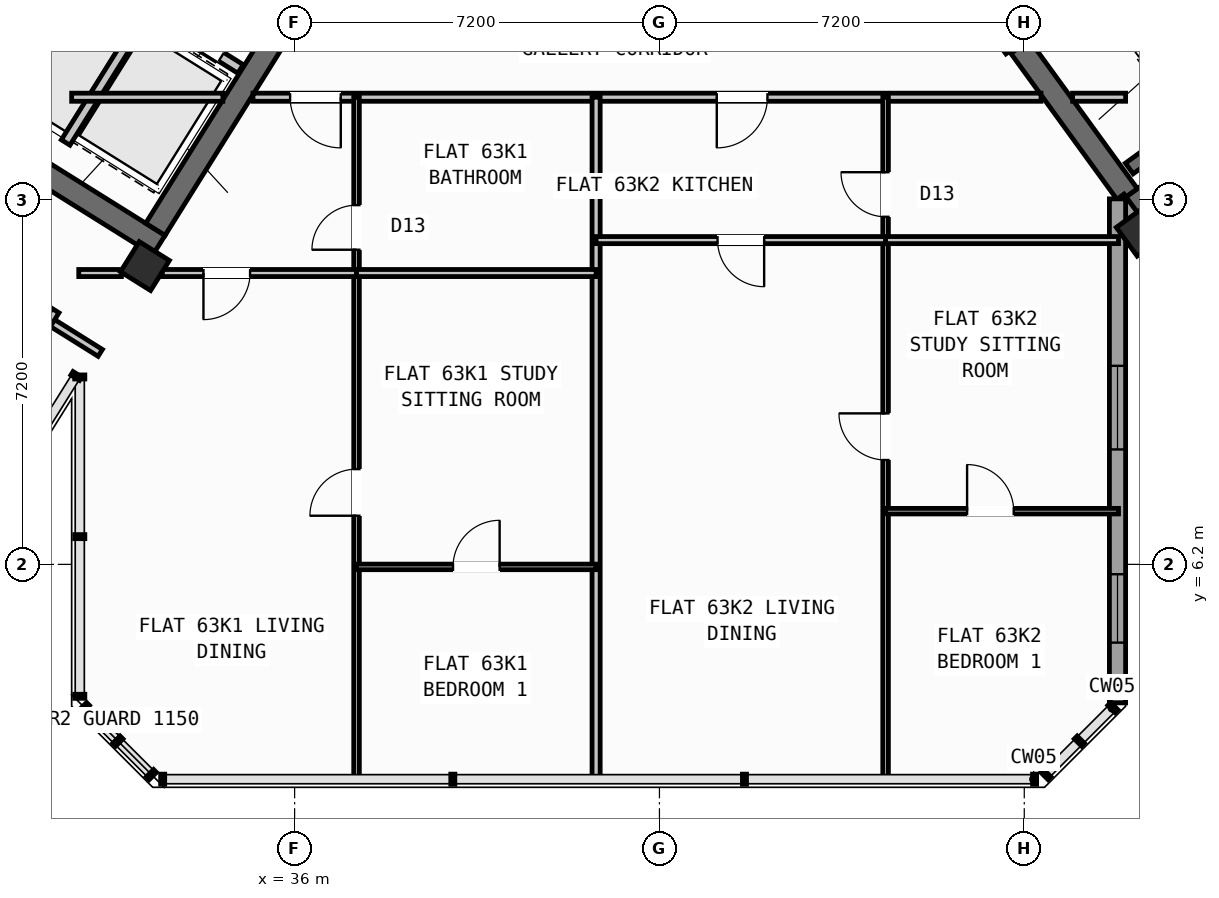
"""IFC4 building model, lengths in metres.
Left out: names, types, materials, properties, quantities, classifications, styles, units other than length and angle.
Written with IfcOpenShell. Run it as: python <this file> out.ifc"""

import sys

from ifc_helpers import new_model, si_unit, direction, frame, frame_2d, origin, origin_2d, place, context, subcontext, project, spatial, rectangle, hollow_rectangle, extrude, source, transform, mapped, element, fill, save


model = new_model("IFC4")
c1 = context("Model", 3, precision=1e-05, world=origin(), true_north=direction((0.0, 1.0)))
c2 = subcontext(c1, "Body", "Model", "MODEL_VIEW")
j1 = project(units=[si_unit("LENGTHUNIT", "METRE"), si_unit("PLANEANGLEUNIT", "RADIAN")], contexts=[c1])
p1 = place(None, origin())
s1 = spatial("IfcSite", under=j1, at=p1, CompositionType="ELEMENT")
p2 = place(p1, origin())
s2 = spatial("IfcBuilding", under=s1, at=p2, CompositionType="ELEMENT")
p3 = place(p2, frame((0.0, 0.0, 251.1)))
s3 = spatial("IfcBuildingStorey", under=s2, at=p3, CompositionType="ELEMENT", Elevation=251.1)
p4 = place(p3, frame((33.324, 12.503, 0.0), z_axis=(0.0, 0.0, 1.0), x_axis=(-0.848043529849, 0.529926571782, 0.0)))
e1 = element("IfcWall", 1, at=p4, inside=s3, PredefinedType="SHEAR", context=c2, shape_type="SweptSolid", body=[
    extrude(rectangle(XDim=13.04, YDim=0.45, at=frame_2d((6.52, 0.0))), origin(), (0.0, 0.0, 1.0), 3.32),
])
p5 = place(p3, frame((36.683, 18.304, 0.0), z_axis=(0.0, 0.0, 1.0), x_axis=(-0.529904039071, -0.848057609704, 0.0)))
e2 = element("IfcWall", 2, at=p5, inside=s3, PredefinedType="SHEAR", context=c2, shape_type="SweptSolid", body=[
    extrude(rectangle(XDim=6.475, YDim=0.45, at=frame_2d((3.238, 0.0))), origin(), (0.0, 0.0, 1.0), 3.32),
])
p6 = place(p3, frame((52.399, 13.169, 0.0), z_axis=(0.0, 0.0, 1.0), x_axis=(0.809022352778, 0.587777877013, 0.0)))
e3 = element("IfcWall", 3, at=p6, inside=s3, PredefinedType="SHEAR", context=c2, shape_type="SweptSolid", body=[
    extrude(rectangle(XDim=12.24, YDim=0.45, at=frame_2d((6.12, 0.0))), origin(), (0.0, 0.0, 1.0), 3.32),
])
p7 = place(p3, frame((52.449, 13.483, 0.0), z_axis=(0.0, 0.0, 1.0), x_axis=(-0.587819244441, 0.808992296542, 0.0)))
e4 = element("IfcWall", 4, at=p7, inside=s3, PredefinedType="SHEAR", context=c2, shape_type="SweptSolid", body=[
    extrude(rectangle(XDim=3.625, YDim=0.45, at=frame_2d((1.812, 0.0))), origin(), (0.0, 0.0, 1.0), 3.32),
])
m1 = source(origin(), c2, "Body", "SweptSolid", [
    extrude(hollow_rectangle(XDim=0.7, YDim=0.7, WallThickness=0.028, at=origin_2d()), origin(), (0.0, 0.0, 1.0), 3.6),
])
for number, where, z_axis, x_axis in (
    (5, (33.046, 12.087, 0.0), (0.0, 0.0, 1.0), (-0.848, 0.53, 0.0)),
    (6, (52.705, 12.773, 0.0), (0.0, 0.0, 1.0), (0.809, 0.588, 0.0)),
):
    element("IfcColumn", number, at=place(p3, frame(where, z_axis=z_axis, x_axis=x_axis)), inside=s3, PredefinedType="COLUMN", context=c2, shape_type="MappedRepresentation", body=[
        mapped(m1, transform((0.0, 0.0, 0.0), scale=1.0)),
    ])
p8 = place(p3, frame((56.581, 7.439, 0.0), z_axis=(0.0, 0.0, 1.0), x_axis=(-0.587776558368, 0.809023310809, 0.0)))
e7 = element("IfcWall", 7, at=p8, inside=s3, PredefinedType="STANDARD", context=c2, shape_type="SweptSolid", body=[
    extrude(rectangle(XDim=7.385, YDim=0.32, at=frame_2d((3.693, 0.0))), origin(), (0.0, 0.0, 1.0), 2.845),
])
p9 = place(p3, frame((52.24, 13.414, 0.0), z_axis=(0.0, 0.0, 1.0), x_axis=(0.0, -1.0, 0.0)))
e8 = element("IfcWall", 8, at=p9, inside=s3, PredefinedType="STANDARD", context=c2, shape_type="SweptSolid", body=[
    extrude(rectangle(XDim=9.948, YDim=0.32, at=frame_2d((4.974, 0.0))), origin(), (0.0, 0.0, 1.0), 3.32),
])
p10 = place(p9, frame((3.295, 0.0, 0.9)))
e9 = element("IfcOpeningElement", 9, at=p10, cuts=e8, PredefinedType="OPENING", context=c2, shape_type="SweptSolid", body=[
    extrude(rectangle(XDim=1.65, YDim=1.45, at=frame_2d((0.825, 0.725))), frame((0.0, 0.17, 0.0), z_axis=(0.0, -1.0, 0.0), x_axis=(1.0, 0.0, 0.0)), (0.0, 0.0, 1.0), 0.34),
])
p11 = place(p9, frame((7.408, 0.0, 0.9)))
e10 = element("IfcOpeningElement", 10, at=p11, cuts=e8, PredefinedType="OPENING", context=c2, shape_type="SweptSolid", body=[
    extrude(rectangle(XDim=1.35, YDim=1.45, at=frame_2d((0.675, 0.725))), frame((0.0, 0.17, 0.0), z_axis=(0.0, -1.0, 0.0), x_axis=(1.0, 0.0, 0.0)), (0.0, 0.0, 1.0), 0.34),
])
p12 = place(p3, frame((31.288, 18.256, 0.0), z_axis=(0.0, 0.0, 1.0), x_axis=(-0.529943379326, -0.848033026897, 0.0)))
e11 = element("IfcWall", 11, at=p12, inside=s3, PredefinedType="SHEAR", context=c2, shape_type="SweptSolid", body=[
    extrude(rectangle(XDim=3.16, YDim=0.26, at=frame_2d((1.58, 0.0))), origin(), (0.0, 0.0, 1.0), 3.32),
])
p13 = place(p3, frame((34.933, 15.978, 0.0), z_axis=(0.0, 0.0, 1.0), x_axis=(-0.848055739377, 0.529907032327, 0.0)))
e12 = element("IfcWall", 12, at=p13, inside=s3, PredefinedType="STANDARD", context=c2, shape_type="SweptSolid", body=[
    extrude(rectangle(XDim=4.298, YDim=0.2, at=frame_2d((2.149, 0.0))), origin(), (0.0, 0.0, 1.0), 3.31),
])
p14 = place(p13, frame((0.448, 0.0, 0.0)))
e13 = element("IfcOpeningElement", 13, at=p14, cuts=e12, PredefinedType="OPENING", context=c2, shape_type="SweptSolid", body=[
    extrude(rectangle(XDim=1.3, YDim=2.2, at=frame_2d((0.65, 1.1))), frame((0.0, 0.11, 0.0), z_axis=(0.0, -1.0, 0.0), x_axis=(1.0, 0.0, 0.0)), (0.0, 0.0, 1.0), 0.22),
])
p15 = place(p13, frame((2.523, 0.0, 0.0)))
e14 = element("IfcOpeningElement", 14, at=p15, cuts=e12, PredefinedType="OPENING", context=c2, shape_type="SweptSolid", body=[
    extrude(rectangle(XDim=1.45, YDim=2.25, at=frame_2d((0.725, 1.125))), frame((0.0, 0.11, 0.0), z_axis=(0.0, -1.0, 0.0), x_axis=(1.0, 0.0, 0.0)), (0.0, 0.0, 1.0), 0.22),
])
p16 = place(p3, frame((33.029, 17.003, 0.0), z_axis=(0.0, 0.0, 1.0), x_axis=(-0.529916267533, -0.848049968695, 0.0)))
e15 = element("IfcWall", 15, at=p16, inside=s3, PredefinedType="STANDARD", context=c2, shape_type="SweptSolid", body=[
    extrude(rectangle(XDim=2.92, YDim=0.2, at=frame_2d((1.46, 0.0))), origin(), (0.0, 0.0, 1.0), 3.31),
])
p17 = place(p3, frame((52.472, 14.013, 0.0), z_axis=(0.0, 0.0, 1.0), x_axis=(0.809028366311, 0.587769599847, 0.0)))
e16 = element("IfcWall", 16, at=p17, inside=s3, PredefinedType="SHEAR", context=c2, shape_type="SweptSolid", body=[
    extrude(rectangle(XDim=7.33, YDim=0.26, at=frame_2d((3.665, 0.0))), origin(), (0.0, 0.0, 1.0), 3.32),
])
p18 = place(p3, frame((32.164, 10.374, 0.0), z_axis=(0.0, 0.0, 1.0), x_axis=(-0.848044107957, 0.529925646633, 0.0)))
e17 = element("IfcWall", 17, at=p18, inside=s3, PredefinedType="PARTITIONING", context=c2, shape_type="SweptSolid", body=[
    extrude(rectangle(XDim=15.57, YDim=0.16, at=frame_2d((7.785, 0.0))), origin(), (0.0, 0.0, 1.0), 3.31),
])
p19 = place(p18, frame((10.83, 0.0, 0.0)))
e18 = element("IfcOpeningElement", 18, at=p19, cuts=e17, PredefinedType="OPENING", context=c2, shape_type="SweptSolid", body=[
    extrude(rectangle(XDim=1.0, YDim=2.1, at=frame_2d((0.5, 1.05))), frame((0.0, 0.09, 0.0), z_axis=(0.0, -1.0, 0.0), x_axis=(1.0, 0.0, 0.0)), (0.0, 0.0, 1.0), 0.18),
])
p20 = place(p3, frame((31.282, 11.208, 0.0), z_axis=(0.0, 0.0, 1.0), x_axis=(-0.529938869374, -0.84803584519, 0.0)))
e19 = element("IfcWall", 19, at=p20, inside=s3, PredefinedType="PARTITIONING", context=c2, shape_type="SweptSolid", body=[
    extrude(rectangle(XDim=5.48, YDim=0.16, at=frame_2d((2.74, 0.0))), origin(), (0.0, 0.0, 1.0), 3.31),
])
p21 = place(p3, frame((31.6, 15.42, 0.0), z_axis=(0.0, 0.0, 1.0), x_axis=(1.0, 0.0, 0.0)))
e20 = element("IfcWall", 20, at=p21, inside=s3, PredefinedType="PARTITIONING", context=c2, shape_type="SweptSolid", body=[
    extrude(rectangle(XDim=2.984, YDim=0.16, at=frame_2d((1.492, 0.0))), origin(), (0.0, 0.0, 1.0), 3.31),
])
p22 = place(p3, frame((35.178, 15.42, 0.0), z_axis=(0.0, 0.0, 1.0), x_axis=(1.0, 0.0, 0.0)))
e21 = element("IfcWall", 21, at=p22, inside=s3, PredefinedType="PARTITIONING", context=c2, shape_type="SweptSolid", body=[
    extrude(rectangle(XDim=15.552, YDim=0.16, at=frame_2d((7.776, 0.0))), origin(), (0.0, 0.0, 1.0), 3.31),
])
p23 = place(p22, frame((0.733, 0.0, 0.0)))
e22 = element("IfcOpeningElement", 22, at=p23, cuts=e21, PredefinedType="OPENING", context=c2, shape_type="SweptSolid", body=[
    extrude(rectangle(XDim=1.0, YDim=2.1, at=frame_2d((0.5, 1.05))), frame((0.0, 0.09, 0.0), z_axis=(0.0, -1.0, 0.0), x_axis=(1.0, 0.0, 0.0)), (0.0, 0.0, 1.0), 0.18),
])
p24 = place(p22, frame((9.153, 0.0, 0.0)))
e23 = element("IfcOpeningElement", 23, at=p24, cuts=e21, PredefinedType="OPENING", context=c2, shape_type="SweptSolid", body=[
    extrude(rectangle(XDim=1.0, YDim=2.1, at=frame_2d((0.5, 1.05))), frame((0.0, 0.09, 0.0), z_axis=(0.0, -1.0, 0.0), x_axis=(1.0, 0.0, 0.0)), (0.0, 0.0, 1.0), 0.18),
])
p25 = place(p3, frame((51.354, 15.42, 0.0), z_axis=(0.0, 0.0, 1.0), x_axis=(1.0, 0.0, 0.0)))
e24 = element("IfcWall", 24, at=p25, inside=s3, PredefinedType="PARTITIONING", context=c2, shape_type="SweptSolid", body=[
    extrude(rectangle(XDim=1.046, YDim=0.16, at=frame_2d((0.523, 0.0))), origin(), (0.0, 0.0, 1.0), 3.31),
])
p26 = place(p3, frame((50.119, 16.333, 0.0), z_axis=(0.0, 0.0, 1.0), x_axis=(-0.587749856981, 0.809042709391, 0.0)))
e25 = element("IfcWall", 25, at=p26, inside=s3, PredefinedType="STANDARD", context=c2, shape_type="SweptSolid", body=[
    extrude(rectangle(XDim=2.96, YDim=0.2, at=frame_2d((1.48, 0.0))), origin(), (0.0, 0.0, 1.0), 3.31),
])
p27 = place(p26, frame((0.53, 0.0, 0.0)))
e26 = element("IfcOpeningElement", 26, at=p27, cuts=e25, PredefinedType="OPENING", context=c2, shape_type="SweptSolid", body=[
    extrude(rectangle(XDim=1.5, YDim=2.15, at=frame_2d((0.75, 1.075))), frame((0.0, 0.11, 0.0), z_axis=(0.0, -1.0, 0.0), x_axis=(1.0, 0.0, 0.0)), (0.0, 0.0, 1.0), 0.22),
])
p28 = place(p3, frame((41.95, 1.96, 0.0), z_axis=(0.0, 0.0, 1.0), x_axis=(0.0, 1.0, 0.0)))
e27 = element("IfcWall", 27, at=p28, inside=s3, PredefinedType="PARTITIONING", context=c2, shape_type="SweptSolid", body=[
    extrude(rectangle(XDim=13.46, YDim=0.16, at=frame_2d((6.73, 0.0))), origin(), (0.0, 0.0, 1.0), 3.31),
])
p29 = place(p3, frame((37.222, 1.96, 0.0), z_axis=(0.0, 0.0, 1.0), x_axis=(0.0, 1.0, 0.0)))
e28 = element("IfcWall", 28, at=p29, inside=s3, PredefinedType="PARTITIONING", context=c2, shape_type="SweptSolid", body=[
    extrude(rectangle(XDim=13.46, YDim=0.11, at=frame_2d((6.73, 0.0))), origin(), (0.0, 0.0, 1.0), 3.31),
])
p30 = place(p29, frame((5.2, 0.0, 0.0)))
e29 = element("IfcOpeningElement", 29, at=p30, cuts=e28, PredefinedType="OPENING", context=c2, shape_type="SweptSolid", body=[
    extrude(rectangle(XDim=0.92, YDim=2.08, at=frame_2d((0.46, 1.04))), frame((0.0, 0.065, 0.0), z_axis=(0.0, -1.0, 0.0), x_axis=(1.0, 0.0, 0.0)), (0.0, 0.0, 1.0), 0.13),
])
p31 = place(p29, frame((10.45, 0.0, 0.0)))
e30 = element("IfcOpeningElement", 30, at=p31, cuts=e28, PredefinedType="OPENING", context=c2, shape_type="SweptSolid", body=[
    extrude(rectangle(XDim=0.88, YDim=2.08, at=frame_2d((0.44, 1.04))), frame((0.0, 0.065, 0.0), z_axis=(0.0, -1.0, 0.0), x_axis=(1.0, 0.0, 0.0)), (0.0, 0.0, 1.0), 0.13),
])
p32 = place(p3, frame((31.74, 11.95, 0.0), z_axis=(0.0, 0.0, 1.0), x_axis=(1.0, 0.0, 0.0)))
e31 = element("IfcWall", 31, at=p32, inside=s3, PredefinedType="PLUMBINGWALL", context=c2, shape_type="SweptSolid", body=[
    extrude(rectangle(XDim=0.842, YDim=0.14, at=frame_2d((0.421, 0.0))), origin(), (0.0, 0.0, 1.0), 3.31),
])
p33 = place(p3, frame((33.387, 11.95, 0.0), z_axis=(0.0, 0.0, 1.0), x_axis=(1.0, 0.0, 0.0)))
e32 = element("IfcWall", 32, at=p33, inside=s3, PredefinedType="PLUMBINGWALL", context=c2, shape_type="SweptSolid", body=[
    extrude(rectangle(XDim=3.834, YDim=0.14, at=frame_2d((1.917, 0.0))), origin(), (0.0, 0.0, 1.0), 2.495),
])
p34 = place(p33, frame((0.813, 0.0, 0.0)))
e33 = element("IfcOpeningElement", 33, at=p34, cuts=e32, PredefinedType="OPENING", context=c2, shape_type="SweptSolid", body=[
    extrude(rectangle(XDim=0.92, YDim=2.08, at=frame_2d((0.46, 1.04))), frame((0.0, 0.08, 0.0), z_axis=(0.0, -1.0, 0.0), x_axis=(1.0, 0.0, 0.0)), (0.0, 0.0, 1.0), 0.16),
])
p35 = place(p3, frame((37.222, 11.95, 0.0), z_axis=(0.0, 0.0, 1.0), x_axis=(1.0, 0.0, 0.0)))
e34 = element("IfcWall", 34, at=p35, inside=s3, PredefinedType="PLUMBINGWALL", context=c2, shape_type="SweptSolid", body=[
    extrude(rectangle(XDim=4.728, YDim=0.14, at=frame_2d((2.364, 0.0))), origin(), (0.0, 0.0, 1.0), 2.495),
])
p36 = place(p3, frame((37.222, 6.15, 0.0), z_axis=(0.0, 0.0, 1.0), x_axis=(1.0, 0.0, 0.0)))
e35 = element("IfcWall", 35, at=p36, inside=s3, PredefinedType="PARTITIONING", context=c2, shape_type="SweptSolid", body=[
    extrude(rectangle(XDim=4.728, YDim=0.11, at=frame_2d((2.364, 0.0))), origin(), (0.0, 0.0, 1.0), 3.31),
])
p37 = place(p36, frame((1.904, 0.0, 0.0)))
e36 = element("IfcOpeningElement", 36, at=p37, cuts=e35, PredefinedType="OPENING", context=c2, shape_type="SweptSolid", body=[
    extrude(rectangle(XDim=0.92, YDim=2.08, at=frame_2d((0.46, 1.04))), frame((0.0, 0.065, 0.0), z_axis=(0.0, -1.0, 0.0), x_axis=(1.0, 0.0, 0.0)), (0.0, 0.0, 1.0), 0.13),
])
p38 = place(p3, frame((47.663, 1.96, 0.0), z_axis=(0.0, 0.0, 1.0), x_axis=(0.0, 1.0, 0.0)))
e37 = element("IfcWall", 37, at=p38, inside=s3, PredefinedType="PARTITIONING", context=c2, shape_type="SweptSolid", body=[
    extrude(rectangle(XDim=13.46, YDim=0.11, at=frame_2d((6.73, 0.0))), origin(), (0.0, 0.0, 1.0), 3.31),
])
p39 = place(p38, frame((6.3, 0.0, 0.0)))
e38 = element("IfcOpeningElement", 38, at=p39, cuts=e37, PredefinedType="OPENING", context=c2, shape_type="SweptSolid", body=[
    extrude(rectangle(XDim=0.92, YDim=2.08, at=frame_2d((0.46, 1.04))), frame((0.0, 0.065, 0.0), z_axis=(0.0, -1.0, 0.0), x_axis=(1.0, 0.0, 0.0)), (0.0, 0.0, 1.0), 0.13),
])
p40 = place(p38, frame((11.1, 0.0, 0.0)))
e39 = element("IfcOpeningElement", 39, at=p40, cuts=e37, PredefinedType="OPENING", context=c2, shape_type="SweptSolid", body=[
    extrude(rectangle(XDim=0.88, YDim=2.08, at=frame_2d((0.44, 1.04))), frame((0.0, 0.065, 0.0), z_axis=(0.0, -1.0, 0.0), x_axis=(1.0, 0.0, 0.0)), (0.0, 0.0, 1.0), 0.13),
])
p41 = place(p3, frame((41.95, 12.6, 0.0), z_axis=(0.0, 0.0, 1.0), x_axis=(1.0, 0.0, 0.0)))
e40 = element("IfcWall", 40, at=p41, inside=s3, PredefinedType="PLUMBINGWALL", context=c2, shape_type="SweptSolid", body=[
    extrude(rectangle(XDim=5.713, YDim=0.14, at=frame_2d((2.856, 0.0))), origin(), (0.0, 0.0, 1.0), 2.495),
])
p42 = place(p41, frame((2.396, 0.0, 0.0)))
e41 = element("IfcOpeningElement", 41, at=p42, cuts=e40, PredefinedType="OPENING", context=c2, shape_type="SweptSolid", body=[
    extrude(rectangle(XDim=0.92, YDim=2.08, at=frame_2d((0.46, 1.04))), frame((0.0, 0.08, 0.0), z_axis=(0.0, -1.0, 0.0), x_axis=(1.0, 0.0, 0.0)), (0.0, 0.0, 1.0), 0.16),
])
p43 = place(p3, frame((47.663, 12.6, 0.0), z_axis=(0.0, 0.0, 1.0), x_axis=(1.0, 0.0, 0.0)))
e42 = element("IfcWall", 42, at=p43, inside=s3, PredefinedType="PLUMBINGWALL", context=c2, shape_type="SweptSolid", body=[
    extrude(rectangle(XDim=4.597, YDim=0.14, at=frame_2d((2.298, 0.0))), origin(), (0.0, 0.0, 1.0), 2.495),
])
p44 = place(p3, frame((47.663, 7.25, 0.0), z_axis=(0.0, 0.0, 1.0), x_axis=(1.0, 0.0, 0.0)))
e43 = element("IfcWall", 43, at=p44, inside=s3, PredefinedType="PARTITIONING", context=c2, shape_type="SweptSolid", body=[
    extrude(rectangle(XDim=4.597, YDim=0.11, at=frame_2d((2.298, 0.0))), origin(), (0.0, 0.0, 1.0), 3.31),
])
p45 = place(p44, frame((1.608, 0.0, 0.0)))
e44 = element("IfcOpeningElement", 44, at=p45, cuts=e43, PredefinedType="OPENING", context=c2, shape_type="SweptSolid", body=[
    extrude(rectangle(XDim=0.92, YDim=2.08, at=frame_2d((0.46, 1.04))), frame((0.0, 0.065, 0.0), z_axis=(0.0, -1.0, 0.0), x_axis=(1.0, 0.0, 0.0)), (0.0, 0.0, 1.0), 0.13),
])
m2 = source(origin(), c2, "Body", "SweptSolid", [
    extrude(rectangle(XDim=1.65, YDim=1.45, at=frame_2d((0.825, 0.725))), frame((0.0, 0.03, 0.0), z_axis=(0.0, -1.0, 0.0), x_axis=(1.0, 0.0, 0.0)), (0.0, 0.0, 1.0), 0.06),
])
p46 = place(p10, origin())
e45 = element("IfcWindow", 45, at=p46, inside=s3, PartitioningType="SINGLE_PANEL", PredefinedType="WINDOW", context=c2, shape_type="MappedRepresentation", body=[
    mapped(m2, transform((0.0, 0.0, 0.0), scale=1.0)),
])
fill(e9, e45)
m3 = source(origin(), c2, "Body", "SweptSolid", [
    extrude(rectangle(XDim=1.35, YDim=1.45, at=frame_2d((0.675, 0.725))), frame((0.0, 0.03, 0.0), z_axis=(0.0, -1.0, 0.0), x_axis=(1.0, 0.0, 0.0)), (0.0, 0.0, 1.0), 0.06),
])
p47 = place(p11, origin())
e46 = element("IfcWindow", 46, at=p47, inside=s3, PartitioningType="SINGLE_PANEL", PredefinedType="WINDOW", context=c2, shape_type="MappedRepresentation", body=[
    mapped(m3, transform((0.0, 0.0, 0.0), scale=1.0)),
])
fill(e10, e46)
m4 = source(origin(), c2, "Body", "SweptSolid", [
    extrude(rectangle(XDim=1.3, YDim=2.2, at=frame_2d((0.65, 1.1))), frame((0.0, 0.025, 0.0), z_axis=(0.0, -1.0, 0.0), x_axis=(1.0, 0.0, 0.0)), (0.0, 0.0, 1.0), 0.05),
])
p48 = place(p14, origin())
e47 = element("IfcDoor", 47, at=p48, inside=s3, OperationType="DOUBLE_DOOR_SLIDING", PredefinedType="DOOR", context=c2, shape_type="MappedRepresentation", body=[
    mapped(m4, transform((0.0, 0.0, 0.0), scale=1.0)),
])
fill(e13, e47)
m5 = source(origin(), c2, "Body", "SweptSolid", [
    extrude(rectangle(XDim=0.92, YDim=2.08, at=frame_2d((0.46, 1.04))), frame((0.0, 0.025, 0.0), z_axis=(0.0, -1.0, 0.0), x_axis=(1.0, 0.0, 0.0)), (0.0, 0.0, 1.0), 0.05),
])
p49 = place(p30, origin())
e48 = element("IfcDoor", 48, at=p49, inside=s3, OperationType="SINGLE_SWING_LEFT", PredefinedType="DOOR", context=c2, shape_type="MappedRepresentation", body=[
    mapped(m5, transform((0.0, 0.0, 0.0), scale=1.0)),
])
fill(e29, e48)
p50 = place(p37, origin())
e49 = element("IfcDoor", 49, at=p50, inside=s3, OperationType="SINGLE_SWING_RIGHT", PredefinedType="DOOR", context=c2, shape_type="MappedRepresentation", body=[
    mapped(m5, transform((0.0, 0.0, 0.0), scale=1.0)),
])
fill(e36, e49)
m6 = source(origin(), c2, "Body", "SweptSolid", [
    extrude(rectangle(XDim=1.0, YDim=2.1, at=frame_2d((0.5, 1.05))), frame((0.0, 0.025, 0.0), z_axis=(0.0, -1.0, 0.0), x_axis=(1.0, 0.0, 0.0)), (0.0, 0.0, 1.0), 0.05),
])
p51 = place(p23, frame((1.0, 0.0, 0.0), z_axis=(0.0, 0.0, 1.0), x_axis=(-1.0, 0.0, 0.0)))
e50 = element("IfcDoor", 50, at=p51, inside=s3, OperationType="SINGLE_SWING_LEFT", PredefinedType="DOOR", context=c2, shape_type="MappedRepresentation", body=[
    mapped(m6, transform((0.0, 0.0, 0.0), scale=1.0)),
])
fill(e22, e50)
p52 = place(p34, frame((0.92, 0.0, 0.0), z_axis=(0.0, 0.0, 1.0), x_axis=(-1.0, 0.0, 0.0)))
e51 = element("IfcDoor", 51, at=p52, inside=s3, OperationType="SINGLE_SWING_RIGHT", PredefinedType="DOOR", context=c2, shape_type="MappedRepresentation", body=[
    mapped(m5, transform((0.0, 0.0, 0.0), scale=1.0)),
])
fill(e33, e51)
m7 = source(origin(), c2, "Body", "SweptSolid", [
    extrude(rectangle(XDim=0.88, YDim=2.08, at=frame_2d((0.44, 1.04))), frame((0.0, 0.025, 0.0), z_axis=(0.0, -1.0, 0.0), x_axis=(1.0, 0.0, 0.0)), (0.0, 0.0, 1.0), 0.05),
])
p53 = place(p31, origin())
e52 = element("IfcDoor", 52, at=p53, inside=s3, OperationType="SINGLE_SWING_LEFT", PredefinedType="DOOR", context=c2, shape_type="MappedRepresentation", body=[
    mapped(m7, transform((0.0, 0.0, 0.0), scale=1.0)),
])
fill(e30, e52)
p54 = place(p39, origin())
e53 = element("IfcDoor", 53, at=p54, inside=s3, OperationType="SINGLE_SWING_RIGHT", PredefinedType="DOOR", context=c2, shape_type="MappedRepresentation", body=[
    mapped(m5, transform((0.0, 0.0, 0.0), scale=1.0)),
])
fill(e38, e53)
p55 = place(p45, origin())
e54 = element("IfcDoor", 54, at=p55, inside=s3, OperationType="SINGLE_SWING_LEFT", PredefinedType="DOOR", context=c2, shape_type="MappedRepresentation", body=[
    mapped(m5, transform((0.0, 0.0, 0.0), scale=1.0)),
])
fill(e44, e54)
p56 = place(p24, frame((1.0, 0.0, 0.0), z_axis=(0.0, 0.0, 1.0), x_axis=(-1.0, 0.0, 0.0)))
e55 = element("IfcDoor", 55, at=p56, inside=s3, OperationType="SINGLE_SWING_RIGHT", PredefinedType="DOOR", context=c2, shape_type="MappedRepresentation", body=[
    mapped(m6, transform((0.0, 0.0, 0.0), scale=1.0)),
])
fill(e23, e55)
p57 = place(p42, frame((0.92, 0.0, 0.0), z_axis=(0.0, 0.0, 1.0), x_axis=(-1.0, 0.0, 0.0)))
e56 = element("IfcDoor", 56, at=p57, inside=s3, OperationType="SINGLE_SWING_LEFT", PredefinedType="DOOR", context=c2, shape_type="MappedRepresentation", body=[
    mapped(m5, transform((0.0, 0.0, 0.0), scale=1.0)),
])
fill(e41, e56)
p58 = place(p40, origin())
e57 = element("IfcDoor", 57, at=p58, inside=s3, OperationType="SINGLE_SWING_RIGHT", PredefinedType="DOOR", context=c2, shape_type="MappedRepresentation", body=[
    mapped(m7, transform((0.0, 0.0, 0.0), scale=1.0)),
])
fill(e39, e57)
save(model, sys.argv[1])
